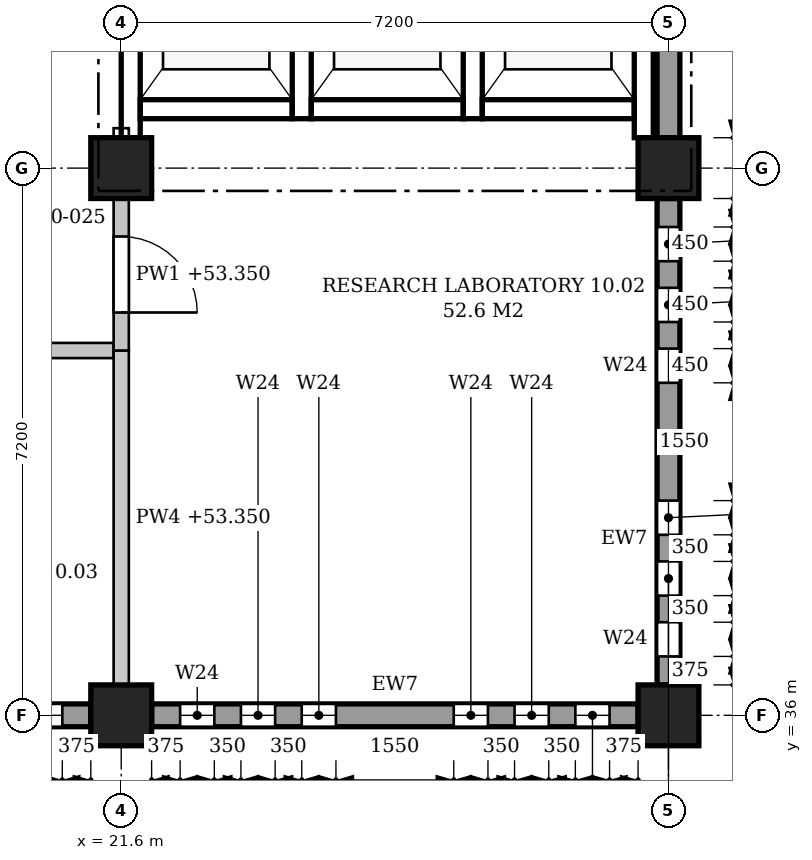
"""IFC4 building model, lengths in metres.
Left out: names, types, materials, properties, quantities, classifications, styles, units other than length and angle.
Written with IfcOpenShell. Run it as: python <this file> out.ifc"""

import sys

from ifc_helpers import new_model, si_unit, direction, frame, frame_2d, origin, origin_2d, place, context, subcontext, project, spatial, polyline, rectangle, outline, extrude, element, fill, save


model = new_model("IFC4")
c1 = context("Model", 3, precision=1e-05, world=origin(), true_north=direction((0.0, 1.0)))
c2 = subcontext(c1, "Body", "Model", "MODEL_VIEW")
j1 = project(units=[si_unit("LENGTHUNIT", "METRE"), si_unit("PLANEANGLEUNIT", "RADIAN")], contexts=[c1])
p1 = place(None, origin())
s1 = spatial("IfcSite", under=j1, at=p1, CompositionType="ELEMENT")
p2 = place(p1, origin())
s2 = spatial("IfcBuilding", under=s1, at=p2, CompositionType="ELEMENT")
p3 = place(p2, frame((0.0, 0.0, 49.8)))
s3 = spatial("IfcBuildingStorey", under=s2, at=p3, CompositionType="ELEMENT", Elevation=49.8)
for number, where, z_axis, x_axis in (
    (1, (21.6, 36.0, 0.0), (0.0, 0.0, 1.0), (1.0, 0.0, 0.0)),
    (2, (21.6, 43.2, 0.0), (0.0, 0.0, 1.0), (1.0, 0.0, 0.0)),
    (3, (28.8, 36.0, 0.0), (0.0, 0.0, 1.0), (1.0, 0.0, 0.0)),
    (4, (28.8, 43.2, 0.0), (0.0, 0.0, 1.0), (1.0, 0.0, 0.0)),
):
    element("IfcColumn", number, at=place(p3, frame(where, z_axis=z_axis, x_axis=x_axis)), inside=s3, PredefinedType="COLUMN", context=c2, shape_type="SweptSolid", body=[
        extrude(rectangle(XDim=0.8, YDim=0.8, at=origin_2d()), origin(), (0.0, 0.0, 1.0), 4.5),
    ])
p4 = place(p3, frame((28.8, 36.4, 0.0), z_axis=(0.0, 0.0, 1.0), x_axis=(0.0, 1.0, 0.0)))
e5 = element("IfcWall", 5, at=p4, inside=s3, PredefinedType="STANDARD", context=c2, shape_type="SweptSolid", body=[
    extrude(rectangle(XDim=6.4, YDim=0.3, at=frame_2d((3.2, 0.0))), origin(), (0.0, 0.0, 1.0), 3.6),
])
p5 = place(p4, frame((0.375, 0.0, 0.9)))
e6 = element("IfcOpeningElement", 6, at=p5, cuts=e5, PredefinedType="OPENING", context=c2, shape_type="SweptSolid", body=[
    extrude(outline(polyline([(0.0, 0.0), (0.45, 0.0), (0.45, 2.35), (0.225, 2.6), (0.0, 2.35), (0.0, 0.0)])), frame((0.0, 0.16, 0.0), z_axis=(0.0, -1.0, 0.0), x_axis=(1.0, 0.0, 0.0)), (0.0, 0.0, 1.0), 0.32),
])
p6 = place(p4, frame((1.175, 0.0, 0.9)))
e7 = element("IfcOpeningElement", 7, at=p6, cuts=e5, PredefinedType="OPENING", context=c2, shape_type="SweptSolid", body=[
    extrude(outline(polyline([(0.0, 0.0), (0.45, 0.0), (0.45, 2.35), (0.225, 2.6), (0.0, 2.35), (0.0, 0.0)])), frame((0.0, 0.16, 0.0), z_axis=(0.0, -1.0, 0.0), x_axis=(1.0, 0.0, 0.0)), (0.0, 0.0, 1.0), 0.32),
])
p7 = place(p4, frame((1.975, 0.0, 0.9)))
e8 = element("IfcOpeningElement", 8, at=p7, cuts=e5, PredefinedType="OPENING", context=c2, shape_type="SweptSolid", body=[
    extrude(outline(polyline([(0.0, 0.0), (0.45, 0.0), (0.45, 2.35), (0.225, 2.6), (0.0, 2.35), (0.0, 0.0)])), frame((0.0, 0.16, 0.0), z_axis=(0.0, -1.0, 0.0), x_axis=(1.0, 0.0, 0.0)), (0.0, 0.0, 1.0), 0.32),
])
p8 = place(p4, frame((3.975, 0.0, 0.9)))
e9 = element("IfcOpeningElement", 9, at=p8, cuts=e5, PredefinedType="OPENING", context=c2, shape_type="SweptSolid", body=[
    extrude(outline(polyline([(0.0, 0.0), (0.45, 0.0), (0.45, 2.35), (0.225, 2.6), (0.0, 2.35), (0.0, 0.0)])), frame((0.0, 0.16, 0.0), z_axis=(0.0, -1.0, 0.0), x_axis=(1.0, 0.0, 0.0)), (0.0, 0.0, 1.0), 0.32),
])
p9 = place(p4, frame((4.775, 0.0, 0.9)))
e10 = element("IfcOpeningElement", 10, at=p9, cuts=e5, PredefinedType="OPENING", context=c2, shape_type="SweptSolid", body=[
    extrude(outline(polyline([(0.0, 0.0), (0.45, 0.0), (0.45, 2.35), (0.225, 2.6), (0.0, 2.35), (0.0, 0.0)])), frame((0.0, 0.16, 0.0), z_axis=(0.0, -1.0, 0.0), x_axis=(1.0, 0.0, 0.0)), (0.0, 0.0, 1.0), 0.32),
])
p10 = place(p4, frame((5.575, 0.0, 0.9)))
e11 = element("IfcOpeningElement", 11, at=p10, cuts=e5, PredefinedType="OPENING", context=c2, shape_type="SweptSolid", body=[
    extrude(outline(polyline([(0.0, 0.0), (0.45, 0.0), (0.45, 2.35), (0.225, 2.6), (0.0, 2.35), (0.0, 0.0)])), frame((0.0, 0.16, 0.0), z_axis=(0.0, -1.0, 0.0), x_axis=(1.0, 0.0, 0.0)), (0.0, 0.0, 1.0), 0.32),
])
p11 = place(p3, frame((28.8, 43.6, 0.0), z_axis=(0.0, 0.0, 1.0), x_axis=(0.0, 1.0, 0.0)))
e12 = element("IfcWall", 12, at=p11, inside=s3, PredefinedType="STANDARD", context=c2, shape_type="SweptSolid", body=[
    extrude(rectangle(XDim=6.4, YDim=0.3, at=frame_2d((3.2, 0.0))), origin(), (0.0, 0.0, 1.0), 3.6),
])
p12 = place(p11, frame((3.975, 0.0, 0.9)))
e13 = element("IfcOpeningElement", 13, at=p12, cuts=e12, PredefinedType="OPENING", context=c2, shape_type="SweptSolid", body=[
    extrude(outline(polyline([(0.0, 0.0), (0.45, 0.0), (0.45, 2.35), (0.225, 2.6), (0.0, 2.35), (0.0, 0.0)])), frame((0.0, 0.16, 0.0), z_axis=(0.0, -1.0, 0.0), x_axis=(1.0, 0.0, 0.0)), (0.0, 0.0, 1.0), 0.32),
])
p13 = place(p11, frame((4.775, 0.0, 0.9)))
e14 = element("IfcOpeningElement", 14, at=p13, cuts=e12, PredefinedType="OPENING", context=c2, shape_type="SweptSolid", body=[
    extrude(outline(polyline([(0.0, 0.0), (0.45, 0.0), (0.45, 2.35), (0.225, 2.6), (0.0, 2.35), (0.0, 0.0)])), frame((0.0, 0.16, 0.0), z_axis=(0.0, -1.0, 0.0), x_axis=(1.0, 0.0, 0.0)), (0.0, 0.0, 1.0), 0.32),
])
p14 = place(p11, frame((5.575, 0.0, 0.9)))
e15 = element("IfcOpeningElement", 15, at=p14, cuts=e12, PredefinedType="OPENING", context=c2, shape_type="SweptSolid", body=[
    extrude(outline(polyline([(0.0, 0.0), (0.45, 0.0), (0.45, 2.35), (0.225, 2.6), (0.0, 2.35), (0.0, 0.0)])), frame((0.0, 0.16, 0.0), z_axis=(0.0, -1.0, 0.0), x_axis=(1.0, 0.0, 0.0)), (0.0, 0.0, 1.0), 0.32),
])
p15 = place(p3, frame((14.8, 36.0, 0.0), z_axis=(0.0, 0.0, 1.0), x_axis=(1.0, 0.0, 0.0)))
e16 = element("IfcWall", 16, at=p15, inside=s3, PredefinedType="STANDARD", context=c2, shape_type="SweptSolid", body=[
    extrude(rectangle(XDim=6.4, YDim=0.3, at=frame_2d((3.2, 0.0))), origin(), (0.0, 0.0, 1.0), 3.6),
])
p16 = place(p15, frame((0.375, 0.0, 0.9)))
e17 = element("IfcOpeningElement", 17, at=p16, cuts=e16, PredefinedType="OPENING", context=c2, shape_type="SweptSolid", body=[
    extrude(outline(polyline([(0.0, 0.0), (0.45, 0.0), (0.45, 2.35), (0.225, 2.6), (0.0, 2.35), (0.0, 0.0)])), frame((0.0, 0.16, 0.0), z_axis=(0.0, -1.0, 0.0), x_axis=(1.0, 0.0, 0.0)), (0.0, 0.0, 1.0), 0.32),
])
p17 = place(p15, frame((1.175, 0.0, 0.9)))
e18 = element("IfcOpeningElement", 18, at=p17, cuts=e16, PredefinedType="OPENING", context=c2, shape_type="SweptSolid", body=[
    extrude(outline(polyline([(0.0, 0.0), (0.45, 0.0), (0.45, 2.35), (0.225, 2.6), (0.0, 2.35), (0.0, 0.0)])), frame((0.0, 0.16, 0.0), z_axis=(0.0, -1.0, 0.0), x_axis=(1.0, 0.0, 0.0)), (0.0, 0.0, 1.0), 0.32),
])
p18 = place(p15, frame((1.975, 0.0, 0.9)))
e19 = element("IfcOpeningElement", 19, at=p18, cuts=e16, PredefinedType="OPENING", context=c2, shape_type="SweptSolid", body=[
    extrude(outline(polyline([(0.0, 0.0), (0.45, 0.0), (0.45, 2.35), (0.225, 2.6), (0.0, 2.35), (0.0, 0.0)])), frame((0.0, 0.16, 0.0), z_axis=(0.0, -1.0, 0.0), x_axis=(1.0, 0.0, 0.0)), (0.0, 0.0, 1.0), 0.32),
])
p19 = place(p15, frame((3.975, 0.0, 0.9)))
e20 = element("IfcOpeningElement", 20, at=p19, cuts=e16, PredefinedType="OPENING", context=c2, shape_type="SweptSolid", body=[
    extrude(outline(polyline([(0.0, 0.0), (0.45, 0.0), (0.45, 2.35), (0.225, 2.6), (0.0, 2.35), (0.0, 0.0)])), frame((0.0, 0.16, 0.0), z_axis=(0.0, -1.0, 0.0), x_axis=(1.0, 0.0, 0.0)), (0.0, 0.0, 1.0), 0.32),
])
p20 = place(p15, frame((4.775, 0.0, 0.9)))
e21 = element("IfcOpeningElement", 21, at=p20, cuts=e16, PredefinedType="OPENING", context=c2, shape_type="SweptSolid", body=[
    extrude(outline(polyline([(0.0, 0.0), (0.45, 0.0), (0.45, 2.35), (0.225, 2.6), (0.0, 2.35), (0.0, 0.0)])), frame((0.0, 0.16, 0.0), z_axis=(0.0, -1.0, 0.0), x_axis=(1.0, 0.0, 0.0)), (0.0, 0.0, 1.0), 0.32),
])
p21 = place(p15, frame((5.575, 0.0, 0.9)))
e22 = element("IfcOpeningElement", 22, at=p21, cuts=e16, PredefinedType="OPENING", context=c2, shape_type="SweptSolid", body=[
    extrude(outline(polyline([(0.0, 0.0), (0.45, 0.0), (0.45, 2.35), (0.225, 2.6), (0.0, 2.35), (0.0, 0.0)])), frame((0.0, 0.16, 0.0), z_axis=(0.0, -1.0, 0.0), x_axis=(1.0, 0.0, 0.0)), (0.0, 0.0, 1.0), 0.32),
])
p22 = place(p3, frame((22.0, 36.0, 0.0), z_axis=(0.0, 0.0, 1.0), x_axis=(1.0, 0.0, 0.0)))
e23 = element("IfcWall", 23, at=p22, inside=s3, PredefinedType="STANDARD", context=c2, shape_type="SweptSolid", body=[
    extrude(rectangle(XDim=6.4, YDim=0.3, at=frame_2d((3.2, 0.0))), origin(), (0.0, 0.0, 1.0), 3.6),
])
p23 = place(p22, frame((0.375, 0.0, 0.9)))
e24 = element("IfcOpeningElement", 24, at=p23, cuts=e23, PredefinedType="OPENING", context=c2, shape_type="SweptSolid", body=[
    extrude(outline(polyline([(0.0, 0.0), (0.45, 0.0), (0.45, 2.35), (0.225, 2.6), (0.0, 2.35), (0.0, 0.0)])), frame((0.0, 0.16, 0.0), z_axis=(0.0, -1.0, 0.0), x_axis=(1.0, 0.0, 0.0)), (0.0, 0.0, 1.0), 0.32),
])
p24 = place(p22, frame((1.175, 0.0, 0.9)))
e25 = element("IfcOpeningElement", 25, at=p24, cuts=e23, PredefinedType="OPENING", context=c2, shape_type="SweptSolid", body=[
    extrude(outline(polyline([(0.0, 0.0), (0.45, 0.0), (0.45, 2.35), (0.225, 2.6), (0.0, 2.35), (0.0, 0.0)])), frame((0.0, 0.16, 0.0), z_axis=(0.0, -1.0, 0.0), x_axis=(1.0, 0.0, 0.0)), (0.0, 0.0, 1.0), 0.32),
])
p25 = place(p22, frame((1.975, 0.0, 0.9)))
e26 = element("IfcOpeningElement", 26, at=p25, cuts=e23, PredefinedType="OPENING", context=c2, shape_type="SweptSolid", body=[
    extrude(outline(polyline([(0.0, 0.0), (0.45, 0.0), (0.45, 2.35), (0.225, 2.6), (0.0, 2.35), (0.0, 0.0)])), frame((0.0, 0.16, 0.0), z_axis=(0.0, -1.0, 0.0), x_axis=(1.0, 0.0, 0.0)), (0.0, 0.0, 1.0), 0.32),
])
p26 = place(p22, frame((3.975, 0.0, 0.9)))
e27 = element("IfcOpeningElement", 27, at=p26, cuts=e23, PredefinedType="OPENING", context=c2, shape_type="SweptSolid", body=[
    extrude(outline(polyline([(0.0, 0.0), (0.45, 0.0), (0.45, 2.35), (0.225, 2.6), (0.0, 2.35), (0.0, 0.0)])), frame((0.0, 0.16, 0.0), z_axis=(0.0, -1.0, 0.0), x_axis=(1.0, 0.0, 0.0)), (0.0, 0.0, 1.0), 0.32),
])
p27 = place(p22, frame((4.775, 0.0, 0.9)))
e28 = element("IfcOpeningElement", 28, at=p27, cuts=e23, PredefinedType="OPENING", context=c2, shape_type="SweptSolid", body=[
    extrude(outline(polyline([(0.0, 0.0), (0.45, 0.0), (0.45, 2.35), (0.225, 2.6), (0.0, 2.35), (0.0, 0.0)])), frame((0.0, 0.16, 0.0), z_axis=(0.0, -1.0, 0.0), x_axis=(1.0, 0.0, 0.0)), (0.0, 0.0, 1.0), 0.32),
])
p28 = place(p22, frame((5.575, 0.0, 0.9)))
e29 = element("IfcOpeningElement", 29, at=p28, cuts=e23, PredefinedType="OPENING", context=c2, shape_type="SweptSolid", body=[
    extrude(outline(polyline([(0.0, 0.0), (0.45, 0.0), (0.45, 2.35), (0.225, 2.6), (0.0, 2.35), (0.0, 0.0)])), frame((0.0, 0.16, 0.0), z_axis=(0.0, -1.0, 0.0), x_axis=(1.0, 0.0, 0.0)), (0.0, 0.0, 1.0), 0.32),
])
p29 = place(p3, frame((21.725, 43.6, -0.25), z_axis=(0.0, 0.0, 1.0), x_axis=(0.0, 1.0, 0.0)))
e30 = element("IfcWall", 30, at=p29, inside=s3, PredefinedType="SHEAR", context=c2, shape_type="SweptSolid", body=[
    extrude(rectangle(XDim=3.55, YDim=0.25, at=frame_2d((1.775, 0.0))), origin(), (0.0, 0.0, 1.0), 3.8),
])
for number, where, z_axis, x_axis in (
    (31, (23.975, 43.85, -0.25), (0.0, 0.0, 1.0), (0.0, 1.0, 0.0)),
    (32, (26.225, 43.85, -0.25), (0.0, 0.0, 1.0), (0.0, 1.0, 0.0)),
):
    element("IfcWall", number, at=place(p3, frame(where, z_axis=z_axis, x_axis=x_axis)), inside=s3, PredefinedType="SHEAR", context=c2, shape_type="SweptSolid", body=[
        extrude(rectangle(XDim=3.3, YDim=0.25, at=frame_2d((1.65, 0.0))), origin(), (0.0, 0.0, 1.0), 4.45),
    ])
p30 = place(p3, frame((28.475, 43.6, -0.25), z_axis=(0.0, 0.0, 1.0), x_axis=(0.0, 1.0, 0.0)))
e33 = element("IfcWall", 33, at=p30, inside=s3, PredefinedType="SHEAR", context=c2, shape_type="SweptSolid", body=[
    extrude(rectangle(XDim=3.55, YDim=0.25, at=frame_2d((1.775, 0.0))), origin(), (0.0, 0.0, 1.0), 4.45),
])
for number, where, z_axis, x_axis in (
    (34, (21.85, 43.975, -0.25), (0.0, 0.0, 1.0), (1.0, 0.0, 0.0)),
    (35, (24.1, 43.975, -0.25), (0.0, 0.0, 1.0), (1.0, 0.0, 0.0)),
    (36, (26.35, 43.975, -0.25), (0.0, 0.0, 1.0), (1.0, 0.0, 0.0)),
):
    element("IfcWall", number, at=place(p3, frame(where, z_axis=z_axis, x_axis=x_axis)), inside=s3, PredefinedType="SHEAR", context=c2, shape_type="SweptSolid", body=[
        extrude(rectangle(XDim=2.0, YDim=0.25, at=frame_2d((1.0, 0.0))), origin(), (0.0, 0.0, 1.0), 4.45),
    ])
p31 = place(p3, frame((18.1, 40.8, 0.0), z_axis=(0.0, 0.0, 1.0), x_axis=(1.0, 0.0, 0.0)))
e37 = element("IfcWall", 37, at=p31, inside=s3, PredefinedType="PARTITIONING", context=c2, shape_type="SweptSolid", body=[
    extrude(outline(polyline([(0.0, 0.0), (3.4, 0.0), (3.4, 3.55), (3.275, 3.55), (3.275, 4.2), (0.0, 4.2), (0.0, 0.0)])), frame((0.0, 0.1, 0.0), z_axis=(0.0, -1.0, 0.0), x_axis=(1.0, 0.0, 0.0)), (0.0, 0.0, 1.0), 0.2),
])
p32 = place(p31, frame((1.2, 0.0, 0.0)))
e38 = element("IfcOpeningElement", 38, at=p32, cuts=e37, PredefinedType="OPENING", context=c2, shape_type="SweptSolid", body=[
    extrude(rectangle(XDim=1.0, YDim=2.1, at=frame_2d((0.5, 1.05))), frame((0.0, 0.11, 0.0), z_axis=(0.0, -1.0, 0.0), x_axis=(1.0, 0.0, 0.0)), (0.0, 0.0, 1.0), 0.22),
])
p33 = place(p3, frame((21.6, 36.4, 0.0), z_axis=(0.0, 0.0, 1.0), x_axis=(0.0, 1.0, 0.0)))
e39 = element("IfcWall", 39, at=p33, inside=s3, PredefinedType="PARTITIONING", context=c2, shape_type="SweptSolid", body=[
    extrude(rectangle(XDim=4.4, YDim=0.2, at=frame_2d((2.2, 0.0))), origin(), (0.0, 0.0, 1.0), 3.55),
])
p34 = place(p3, frame((21.6, 40.8, 0.0), z_axis=(0.0, 0.0, 1.0), x_axis=(0.0, 1.0, 0.0)))
e40 = element("IfcWall", 40, at=p34, inside=s3, PredefinedType="PARTITIONING", context=c2, shape_type="SweptSolid", body=[
    extrude(rectangle(XDim=2.0, YDim=0.2, at=frame_2d((1.0, 0.0))), origin(), (0.0, 0.0, 1.0), 3.55),
])
p35 = place(p34, frame((0.5, 0.0, 0.0)))
e41 = element("IfcOpeningElement", 41, at=p35, cuts=e40, PredefinedType="OPENING", context=c2, shape_type="SweptSolid", body=[
    extrude(rectangle(XDim=1.0, YDim=2.1, at=frame_2d((0.5, 1.05))), frame((0.0, 0.11, 0.0), z_axis=(0.0, -1.0, 0.0), x_axis=(1.0, 0.0, 0.0)), (0.0, 0.0, 1.0), 0.22),
])
p36 = place(p3, frame((21.6, 43.6, 0.0), z_axis=(0.0, 0.0, 1.0), x_axis=(0.0, 1.0, 0.0)))
e42 = element("IfcWall", 42, at=p36, inside=s3, PredefinedType="PARTITIONING", context=c2, shape_type="SweptSolid", body=[
    extrude(rectangle(XDim=0.125, YDim=0.2, at=frame_2d((0.062, 0.0))), origin(), (0.0, 0.0, 1.0), 3.55),
])
p37 = place(p5, origin())
e43 = element("IfcWindow", 43, at=p37, inside=s3, PartitioningType="SINGLE_PANEL", PredefinedType="WINDOW", context=c2, shape_type="SweptSolid", body=[
    extrude(outline(polyline([(0.0, 0.0), (0.45, 0.0), (0.45, 2.35), (0.225, 2.6), (0.0, 2.35), (0.0, 0.0)])), frame((0.0, 0.03, 0.0), z_axis=(0.0, -1.0, 0.0), x_axis=(1.0, 0.0, 0.0)), (0.0, 0.0, 1.0), 0.06),
])
fill(e6, e43)
p38 = place(p6, origin())
e44 = element("IfcWindow", 44, at=p38, inside=s3, PartitioningType="SINGLE_PANEL", PredefinedType="WINDOW", context=c2, shape_type="SweptSolid", body=[
    extrude(outline(polyline([(0.0, 0.0), (0.45, 0.0), (0.45, 2.35), (0.225, 2.6), (0.0, 2.35), (0.0, 0.0)])), frame((0.0, 0.03, 0.0), z_axis=(0.0, -1.0, 0.0), x_axis=(1.0, 0.0, 0.0)), (0.0, 0.0, 1.0), 0.06),
])
fill(e7, e44)
p39 = place(p7, origin())
e45 = element("IfcWindow", 45, at=p39, inside=s3, PartitioningType="SINGLE_PANEL", PredefinedType="WINDOW", context=c2, shape_type="SweptSolid", body=[
    extrude(outline(polyline([(0.0, 0.0), (0.45, 0.0), (0.45, 2.35), (0.225, 2.6), (0.0, 2.35), (0.0, 0.0)])), frame((0.0, 0.03, 0.0), z_axis=(0.0, -1.0, 0.0), x_axis=(1.0, 0.0, 0.0)), (0.0, 0.0, 1.0), 0.06),
])
fill(e8, e45)
p40 = place(p8, origin())
e46 = element("IfcWindow", 46, at=p40, inside=s3, PartitioningType="SINGLE_PANEL", PredefinedType="WINDOW", context=c2, shape_type="SweptSolid", body=[
    extrude(outline(polyline([(0.0, 0.0), (0.45, 0.0), (0.45, 2.35), (0.225, 2.6), (0.0, 2.35), (0.0, 0.0)])), frame((0.0, 0.03, 0.0), z_axis=(0.0, -1.0, 0.0), x_axis=(1.0, 0.0, 0.0)), (0.0, 0.0, 1.0), 0.06),
])
fill(e9, e46)
p41 = place(p9, origin())
e47 = element("IfcWindow", 47, at=p41, inside=s3, PartitioningType="SINGLE_PANEL", PredefinedType="WINDOW", context=c2, shape_type="SweptSolid", body=[
    extrude(outline(polyline([(0.0, 0.0), (0.45, 0.0), (0.45, 2.35), (0.225, 2.6), (0.0, 2.35), (0.0, 0.0)])), frame((0.0, 0.03, 0.0), z_axis=(0.0, -1.0, 0.0), x_axis=(1.0, 0.0, 0.0)), (0.0, 0.0, 1.0), 0.06),
])
fill(e10, e47)
p42 = place(p10, origin())
e48 = element("IfcWindow", 48, at=p42, inside=s3, PartitioningType="SINGLE_PANEL", PredefinedType="WINDOW", context=c2, shape_type="SweptSolid", body=[
    extrude(outline(polyline([(0.0, 0.0), (0.45, 0.0), (0.45, 2.35), (0.225, 2.6), (0.0, 2.35), (0.0, 0.0)])), frame((0.0, 0.03, 0.0), z_axis=(0.0, -1.0, 0.0), x_axis=(1.0, 0.0, 0.0)), (0.0, 0.0, 1.0), 0.06),
])
fill(e11, e48)
p43 = place(p21, origin())
e49 = element("IfcWindow", 49, at=p43, inside=s3, PartitioningType="SINGLE_PANEL", PredefinedType="WINDOW", context=c2, shape_type="SweptSolid", body=[
    extrude(outline(polyline([(0.0, 0.0), (0.45, 0.0), (0.45, 2.35), (0.225, 2.6), (0.0, 2.35), (0.0, 0.0)])), frame((0.0, 0.03, 0.0), z_axis=(0.0, -1.0, 0.0), x_axis=(1.0, 0.0, 0.0)), (0.0, 0.0, 1.0), 0.06),
])
fill(e22, e49)
p44 = place(p23, origin())
e50 = element("IfcWindow", 50, at=p44, inside=s3, PartitioningType="SINGLE_PANEL", PredefinedType="WINDOW", context=c2, shape_type="SweptSolid", body=[
    extrude(outline(polyline([(0.0, 0.0), (0.45, 0.0), (0.45, 2.35), (0.225, 2.6), (0.0, 2.35), (0.0, 0.0)])), frame((0.0, 0.03, 0.0), z_axis=(0.0, -1.0, 0.0), x_axis=(1.0, 0.0, 0.0)), (0.0, 0.0, 1.0), 0.06),
])
fill(e24, e50)
p45 = place(p24, origin())
e51 = element("IfcWindow", 51, at=p45, inside=s3, PartitioningType="SINGLE_PANEL", PredefinedType="WINDOW", context=c2, shape_type="SweptSolid", body=[
    extrude(outline(polyline([(0.0, 0.0), (0.45, 0.0), (0.45, 2.35), (0.225, 2.6), (0.0, 2.35), (0.0, 0.0)])), frame((0.0, 0.03, 0.0), z_axis=(0.0, -1.0, 0.0), x_axis=(1.0, 0.0, 0.0)), (0.0, 0.0, 1.0), 0.06),
])
fill(e25, e51)
p46 = place(p25, origin())
e52 = element("IfcWindow", 52, at=p46, inside=s3, PartitioningType="SINGLE_PANEL", PredefinedType="WINDOW", context=c2, shape_type="SweptSolid", body=[
    extrude(outline(polyline([(0.0, 0.0), (0.45, 0.0), (0.45, 2.35), (0.225, 2.6), (0.0, 2.35), (0.0, 0.0)])), frame((0.0, 0.03, 0.0), z_axis=(0.0, -1.0, 0.0), x_axis=(1.0, 0.0, 0.0)), (0.0, 0.0, 1.0), 0.06),
])
fill(e26, e52)
p47 = place(p26, origin())
e53 = element("IfcWindow", 53, at=p47, inside=s3, PartitioningType="SINGLE_PANEL", PredefinedType="WINDOW", context=c2, shape_type="SweptSolid", body=[
    extrude(outline(polyline([(0.0, 0.0), (0.45, 0.0), (0.45, 2.35), (0.225, 2.6), (0.0, 2.35), (0.0, 0.0)])), frame((0.0, 0.03, 0.0), z_axis=(0.0, -1.0, 0.0), x_axis=(1.0, 0.0, 0.0)), (0.0, 0.0, 1.0), 0.06),
])
fill(e27, e53)
p48 = place(p27, origin())
e54 = element("IfcWindow", 54, at=p48, inside=s3, PartitioningType="SINGLE_PANEL", PredefinedType="WINDOW", context=c2, shape_type="SweptSolid", body=[
    extrude(outline(polyline([(0.0, 0.0), (0.45, 0.0), (0.45, 2.35), (0.225, 2.6), (0.0, 2.35), (0.0, 0.0)])), frame((0.0, 0.03, 0.0), z_axis=(0.0, -1.0, 0.0), x_axis=(1.0, 0.0, 0.0)), (0.0, 0.0, 1.0), 0.06),
])
fill(e28, e54)
p49 = place(p28, origin())
e55 = element("IfcWindow", 55, at=p49, inside=s3, PartitioningType="SINGLE_PANEL", PredefinedType="WINDOW", context=c2, shape_type="SweptSolid", body=[
    extrude(outline(polyline([(0.0, 0.0), (0.45, 0.0), (0.45, 2.35), (0.225, 2.6), (0.0, 2.35), (0.0, 0.0)])), frame((0.0, 0.03, 0.0), z_axis=(0.0, -1.0, 0.0), x_axis=(1.0, 0.0, 0.0)), (0.0, 0.0, 1.0), 0.06),
])
fill(e29, e55)
p50 = place(p35, frame((1.0, 0.0, 0.0), z_axis=(0.0, 0.0, 1.0), x_axis=(-1.0, 0.0, 0.0)))
e56 = element("IfcDoor", 56, at=p50, inside=s3, OperationType="SINGLE_SWING_RIGHT", PredefinedType="DOOR", context=c2, shape_type="SweptSolid", body=[
    extrude(rectangle(XDim=1.0, YDim=2.1, at=frame_2d((0.5, 1.05))), frame((0.0, 0.025, 0.0), z_axis=(0.0, -1.0, 0.0), x_axis=(1.0, 0.0, 0.0)), (0.0, 0.0, 1.0), 0.05),
])
fill(e41, e56)
save(model, sys.argv[1])
